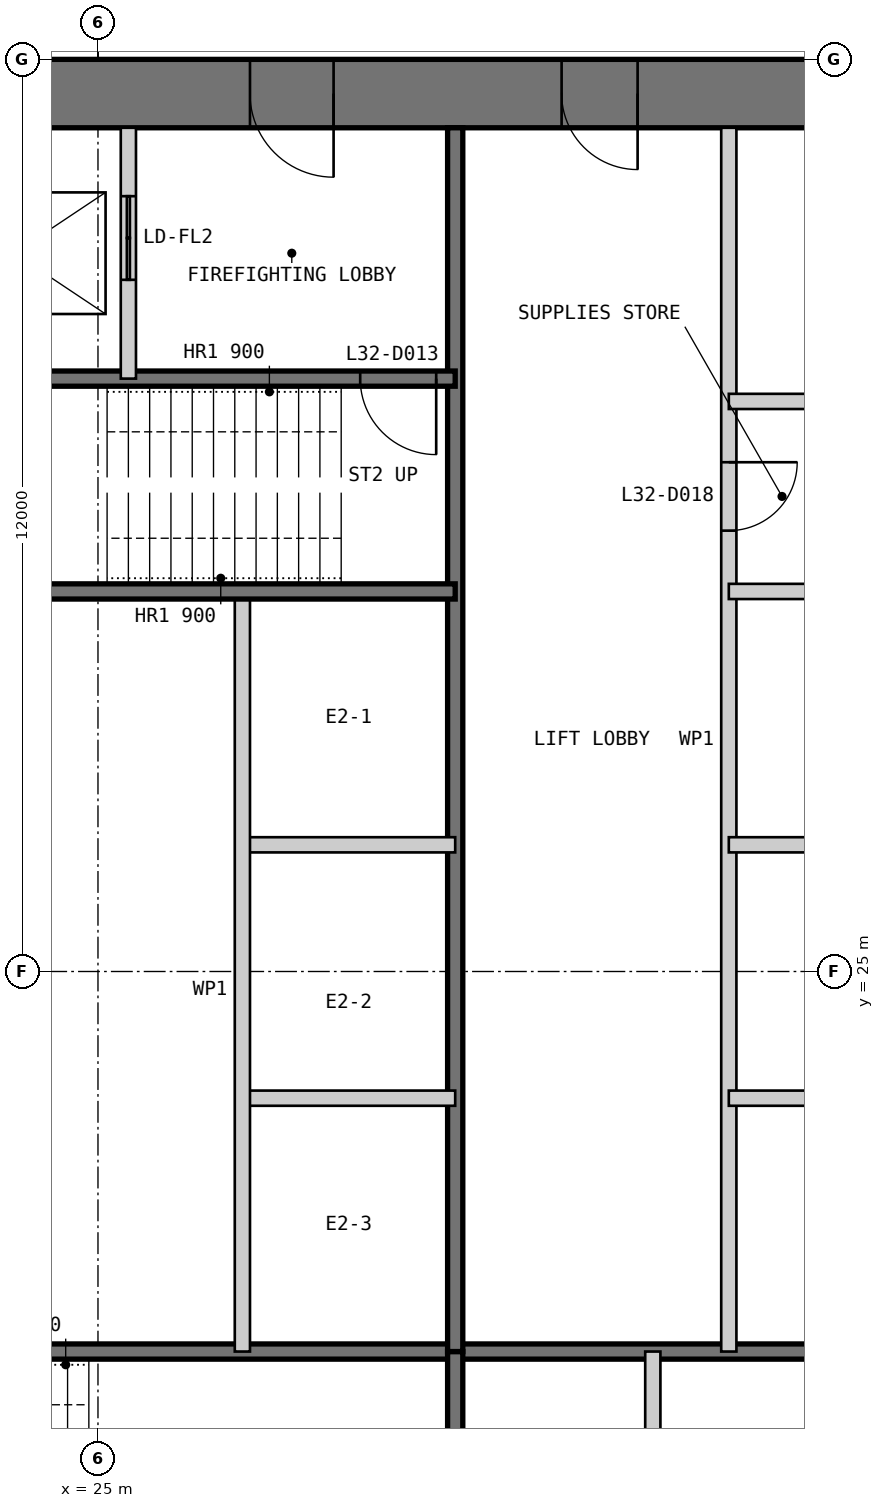
"""IFC4 building model, lengths in metres.
Left out: names, types, materials, properties, quantities, classifications, styles, units other than length and angle.
Written with IfcOpenShell. Run it as: python <this file> out.ifc"""

import sys

from ifc_helpers import new_model, si_unit, direction, frame, frame_2d, origin, place, context, subcontext, project, spatial, polyline, rectangle, outline, extrude, element, fill, save


model = new_model("IFC4")
c1 = context("Model", 3, precision=1e-05, world=origin(), true_north=direction((0.0, 1.0)))
c2 = subcontext(c1, "Body", "Model", "MODEL_VIEW")
j1 = project(units=[si_unit("LENGTHUNIT", "METRE"), si_unit("PLANEANGLEUNIT", "RADIAN")], contexts=[c1])
p1 = place(None, origin())
s1 = spatial("IfcSite", under=j1, at=p1, CompositionType="ELEMENT")
p2 = place(p1, origin())
s2 = spatial("IfcBuilding", under=s1, at=p2, CompositionType="ELEMENT")
p3 = place(p2, frame((0.0, 0.0, 138.4)))
s3 = spatial("IfcBuildingStorey", under=s2, at=p3, CompositionType="ELEMENT", Elevation=138.4)
p4 = place(p3, frame((37.0, 36.55, 0.0), z_axis=(0.0, 0.0, 1.0), x_axis=(-1.0, 0.0, 0.0)))
e1 = element("IfcWall", 1, at=p4, inside=s3, PredefinedType="SHEAR", context=c2, shape_type="SweptSolid", body=[
    extrude(outline(polyline([(0.0, -0.45), (24.0, -0.45), (23.1, 0.45), (0.9, 0.45), (0.0, -0.45)])), origin(), (0.0, 0.0, 1.0), 4.0),
])
p5 = place(p4, frame((4.9, 0.0, 0.0)))
e2 = element("IfcOpeningElement", 2, at=p5, cuts=e1, PredefinedType="OPENING", context=c2, shape_type="SweptSolid", body=[
    extrude(rectangle(XDim=1.0, YDim=2.2, at=frame_2d((0.5, 1.1))), frame((0.0, 0.46, 0.0), z_axis=(0.0, -1.0, 0.0), x_axis=(1.0, 0.0, 0.0)), (0.0, 0.0, 1.0), 0.92),
])
p6 = place(p4, frame((8.9, 0.0, 0.0)))
e3 = element("IfcOpeningElement", 3, at=p6, cuts=e1, PredefinedType="OPENING", context=c2, shape_type="SweptSolid", body=[
    extrude(rectangle(XDim=1.1, YDim=2.2, at=frame_2d((0.55, 1.1))), frame((0.0, 0.46, 0.0), z_axis=(0.0, -1.0, 0.0), x_axis=(1.0, 0.0, 0.0)), (0.0, 0.0, 1.0), 0.92),
])
p7 = place(p4, frame((15.05, 0.0, 0.0)))
e4 = element("IfcOpeningElement", 4, at=p7, cuts=e1, PredefinedType="OPENING", context=c2, shape_type="SweptSolid", body=[
    extrude(rectangle(XDim=0.9, YDim=2.2, at=frame_2d((0.45, 1.1))), frame((0.0, 0.46, 0.0), z_axis=(0.0, -1.0, 0.0), x_axis=(1.0, 0.0, 0.0)), (0.0, 0.0, 1.0), 0.92),
])
p8 = place(p4, frame((17.9, 0.0, 0.0)))
e5 = element("IfcOpeningElement", 5, at=p8, cuts=e1, PredefinedType="OPENING", context=c2, shape_type="SweptSolid", body=[
    extrude(rectangle(XDim=1.0, YDim=2.2, at=frame_2d((0.5, 1.1))), frame((0.0, 0.46, 0.0), z_axis=(0.0, -1.0, 0.0), x_axis=(1.0, 0.0, 0.0)), (0.0, 0.0, 1.0), 0.92),
])
p9 = place(p4, frame((21.4, 0.0, 0.0)))
e6 = element("IfcOpeningElement", 6, at=p9, cuts=e1, PredefinedType="OPENING", context=c2, shape_type="SweptSolid", body=[
    extrude(rectangle(XDim=1.0, YDim=2.2, at=frame_2d((0.5, 1.1))), frame((0.0, 0.46, 0.0), z_axis=(0.0, -1.0, 0.0), x_axis=(1.0, 0.0, 0.0)), (0.0, 0.0, 1.0), 0.92),
])
p10 = place(p3, frame((20.3, 20.0, 0.0), z_axis=(0.0, 0.0, 1.0), x_axis=(1.0, 0.0, 0.0)))
e7 = element("IfcWall", 7, at=p10, inside=s3, PredefinedType="SOLIDWALL", context=c2, shape_type="SweptSolid", body=[
    extrude(rectangle(XDim=15.8, YDim=0.2, at=frame_2d((7.9, 0.0))), origin(), (0.0, 0.0, 1.0), 3.8),
])
p11 = place(p3, frame((29.7, 13.9, 0.0), z_axis=(0.0, 0.0, 1.0), x_axis=(0.0, 1.0, 0.0)))
e8 = element("IfcWall", 8, at=p11, inside=s3, PredefinedType="SOLIDWALL", context=c2, shape_type="SweptSolid", body=[
    extrude(rectangle(XDim=6.1, YDim=0.2, at=frame_2d((3.05, 0.0))), origin(), (0.0, 0.0, 1.0), 3.8),
])
p12 = place(p3, frame((32.3, 13.9, 0.0), z_axis=(0.0, 0.0, 1.0), x_axis=(0.0, 1.0, 0.0)))
e9 = element("IfcWall", 9, at=p12, inside=s3, PredefinedType="PARTITIONING", context=c2, shape_type="SweptSolid", body=[
    extrude(rectangle(XDim=6.1, YDim=0.2, at=frame_2d((3.05, 0.0))), origin(), (0.0, 0.0, 1.0), 3.8),
])
p13 = place(p3, frame((33.3, 36.1, 0.0), z_axis=(0.0, 0.0, 1.0), x_axis=(0.0, -1.0, 0.0)))
e10 = element("IfcWall", 10, at=p13, inside=s3, PredefinedType="PARTITIONING", context=c2, shape_type="SweptSolid", body=[
    extrude(rectangle(XDim=16.1, YDim=0.2, at=frame_2d((8.05, 0.0))), origin(), (0.0, 0.0, 1.0), 3.8),
])
p14 = place(p13, frame((4.4, 0.0, 0.0)))
e11 = element("IfcOpeningElement", 11, at=p14, cuts=e10, PredefinedType="OPENING", context=c2, shape_type="SweptSolid", body=[
    extrude(rectangle(XDim=0.9, YDim=2.2, at=frame_2d((0.45, 1.1))), frame((0.0, 0.11, 0.0), z_axis=(0.0, -1.0, 0.0), x_axis=(1.0, 0.0, 0.0)), (0.0, 0.0, 1.0), 0.22),
])
p15 = place(p3, frame((29.7, 36.1, 0.0), z_axis=(0.0, 0.0, 1.0), x_axis=(0.0, -1.0, 0.0)))
e12 = element("IfcWall", 12, at=p15, inside=s3, PredefinedType="SOLIDWALL", context=c2, shape_type="SweptSolid", body=[
    extrude(rectangle(XDim=16.1, YDim=0.2, at=frame_2d((8.05, 0.0))), origin(), (0.0, 0.0, 1.0), 3.8),
])
for number, where, z_axis, x_axis in (
    (13, (36.1, 30.0, 0.0), (0.0, 0.0, 1.0), (-1.0, 0.0, 0.0)),
    (14, (36.1, 26.667, 0.0), (0.0, 0.0, 1.0), (-1.0, 0.0, 0.0)),
    (15, (36.1, 23.333, 0.0), (0.0, 0.0, 1.0), (-1.0, 0.0, 0.0)),
    (16, (29.7, 26.667, 0.0), (0.0, 0.0, 1.0), (-1.0, 0.0, 0.0)),
    (17, (29.7, 23.333, 0.0), (0.0, 0.0, 1.0), (-1.0, 0.0, 0.0)),
):
    element("IfcWall", number, at=place(p3, frame(where, z_axis=z_axis, x_axis=x_axis)), inside=s3, PredefinedType="PARTITIONING", context=c2, shape_type="SweptSolid", body=[
        extrude(rectangle(XDim=2.8, YDim=0.2, at=frame_2d((1.4, 0.0))), origin(), (0.0, 0.0, 1.0), 3.8),
    ])
p16 = place(p3, frame((26.9, 30.0, 0.0), z_axis=(0.0, 0.0, 1.0), x_axis=(0.0, -1.0, 0.0)))
e18 = element("IfcWall", 18, at=p16, inside=s3, PredefinedType="PARTITIONING", context=c2, shape_type="SweptSolid", body=[
    extrude(rectangle(XDim=10.0, YDim=0.2, at=frame_2d((5.0, 0.0))), origin(), (0.0, 0.0, 1.0), 3.8),
])
p17 = place(p3, frame((29.7, 32.8, 0.0), z_axis=(0.0, 0.0, 1.0), x_axis=(-1.0, 0.0, 0.0)))
e19 = element("IfcWall", 19, at=p17, inside=s3, PredefinedType="SOLIDWALL", context=c2, shape_type="SweptSolid", body=[
    extrude(rectangle(XDim=9.4, YDim=0.2, at=frame_2d((4.7, 0.0))), origin(), (0.0, 0.0, 1.0), 3.8),
])
p18 = place(p17, frame((0.25, 0.0, 0.0)))
e20 = element("IfcOpeningElement", 20, at=p18, cuts=e19, PredefinedType="OPENING", context=c2, shape_type="SweptSolid", body=[
    extrude(rectangle(XDim=1.0, YDim=2.2, at=frame_2d((0.5, 1.1))), frame((0.0, 0.11, 0.0), z_axis=(0.0, -1.0, 0.0), x_axis=(1.0, 0.0, 0.0)), (0.0, 0.0, 1.0), 0.22),
])
p19 = place(p3, frame((29.7, 30.0, 0.0), z_axis=(0.0, 0.0, 1.0), x_axis=(-1.0, 0.0, 0.0)))
e21 = element("IfcWall", 21, at=p19, inside=s3, PredefinedType="SOLIDWALL", context=c2, shape_type="SweptSolid", body=[
    extrude(rectangle(XDim=15.8, YDim=0.2, at=frame_2d((7.9, 0.0))), origin(), (0.0, 0.0, 1.0), 3.8),
])
p20 = place(p3, frame((25.4, 36.1, 0.0), z_axis=(0.0, 0.0, 1.0), x_axis=(0.0, -1.0, 0.0)))
e22 = element("IfcWall", 22, at=p20, inside=s3, PredefinedType="PARTITIONING", context=c2, shape_type="SweptSolid", body=[
    extrude(rectangle(XDim=3.3, YDim=0.2, at=frame_2d((1.65, 0.0))), origin(), (0.0, 0.0, 1.0), 3.8),
])
p21 = place(p20, frame((0.9, 0.0, 0.0)))
e23 = element("IfcOpeningElement", 23, at=p21, cuts=e22, PredefinedType="OPENING", context=c2, shape_type="SweptSolid", body=[
    extrude(rectangle(XDim=1.1, YDim=2.2, at=frame_2d((0.55, 1.1))), frame((0.0, 0.11, 0.0), z_axis=(0.0, -1.0, 0.0), x_axis=(1.0, 0.0, 0.0)), (0.0, 0.0, 1.0), 0.22),
])
p22 = place(p3, frame((36.1, 32.5, 0.0), z_axis=(0.0, 0.0, 1.0), x_axis=(-1.0, 0.0, 0.0)))
e24 = element("IfcWall", 24, at=p22, inside=s3, PredefinedType="PARTITIONING", context=c2, shape_type="SweptSolid", body=[
    extrude(rectangle(XDim=2.8, YDim=0.2, at=frame_2d((1.4, 0.0))), origin(), (0.0, 0.0, 1.0), 3.8),
])
p23 = place(p5, origin())
e25 = element("IfcDoor", 25, at=p23, inside=s3, OperationType="SINGLE_SWING_LEFT", PredefinedType="DOOR", context=c2, shape_type="SweptSolid", body=[
    extrude(rectangle(XDim=1.0, YDim=2.2, at=frame_2d((0.5, 1.1))), frame((0.0, 0.025, 0.0), z_axis=(0.0, -1.0, 0.0), x_axis=(1.0, 0.0, 0.0)), (0.0, 0.0, 1.0), 0.05),
    extrude(outline(polyline([(0.0, 0.0), (0.04, 0.0), (0.04, 2.16), (0.96, 2.16), (0.96, 0.0), (1.0, 0.0), (1.0, 2.2), (0.0, 2.2), (0.0, 0.0)])), frame((0.0, 0.3, 0.0), z_axis=(0.0, -1.0, 0.0), x_axis=(1.0, 0.0, 0.0)), (0.0, 0.0, 1.0), 0.6),
])
fill(e2, e25)
p24 = place(p6, origin())
e26 = element("IfcDoor", 26, at=p24, inside=s3, OperationType="SINGLE_SWING_LEFT", PredefinedType="DOOR", context=c2, shape_type="SweptSolid", body=[
    extrude(rectangle(XDim=1.1, YDim=2.2, at=frame_2d((0.55, 1.1))), frame((0.0, 0.025, 0.0), z_axis=(0.0, -1.0, 0.0), x_axis=(1.0, 0.0, 0.0)), (0.0, 0.0, 1.0), 0.05),
    extrude(outline(polyline([(0.0, 0.0), (0.04, 0.0), (0.04, 2.16), (1.06, 2.16), (1.06, 0.0), (1.1, 0.0), (1.1, 2.2), (0.0, 2.2), (0.0, 0.0)])), frame((0.0, 0.3, 0.0), z_axis=(0.0, -1.0, 0.0), x_axis=(1.0, 0.0, 0.0)), (0.0, 0.0, 1.0), 0.6),
])
fill(e3, e26)
p25 = place(p18, origin())
e27 = element("IfcDoor", 27, at=p25, inside=s3, OperationType="SINGLE_SWING_LEFT", PredefinedType="DOOR", context=c2, shape_type="SweptSolid", body=[
    extrude(rectangle(XDim=1.0, YDim=2.2, at=frame_2d((0.5, 1.1))), frame((0.0, 0.025, 0.0), z_axis=(0.0, -1.0, 0.0), x_axis=(1.0, 0.0, 0.0)), (0.0, 0.0, 1.0), 0.05),
])
fill(e20, e27)
p26 = place(p14, origin())
e28 = element("IfcDoor", 28, at=p26, inside=s3, OperationType="SINGLE_SWING_LEFT", PredefinedType="DOOR", context=c2, shape_type="SweptSolid", body=[
    extrude(rectangle(XDim=0.9, YDim=2.2, at=frame_2d((0.45, 1.1))), frame((0.0, 0.025, 0.0), z_axis=(0.0, -1.0, 0.0), x_axis=(1.0, 0.0, 0.0)), (0.0, 0.0, 1.0), 0.05),
])
fill(e11, e28)
p27 = place(p21, origin())
e29 = element("IfcDoor", 29, at=p27, inside=s3, OperationType="DOUBLE_DOOR_SLIDING", PredefinedType="DOOR", context=c2, shape_type="SweptSolid", body=[
    extrude(rectangle(XDim=1.1, YDim=2.2, at=frame_2d((0.55, 1.1))), frame((0.0, 0.025, 0.0), z_axis=(0.0, -1.0, 0.0), x_axis=(1.0, 0.0, 0.0)), (0.0, 0.0, 1.0), 0.05),
])
fill(e23, e29)
save(model, sys.argv[1])
